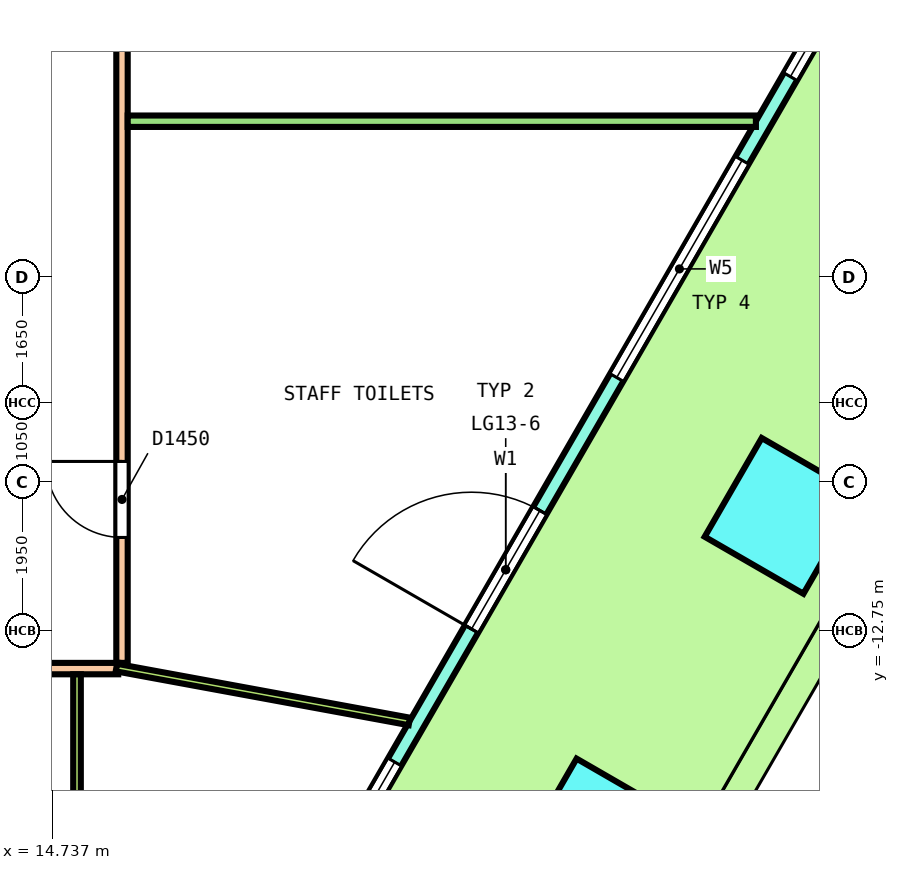
"""IFC4 building model, lengths in metres.
Left out: names, types, materials, properties, quantities, classifications, styles, units other than length and angle.
Written with IfcOpenShell. Run it as: python <this file> out.ifc"""

import sys

from ifc_helpers import new_model, si_unit, direction, frame, frame_2d, origin, origin_2d, place, context, subcontext, project, spatial, polyline, rectangle, outline, extrude, element, fill, save


model = new_model("IFC4")
c1 = context("Model", 3, precision=1e-05, world=origin(), true_north=direction((0.0, 1.0)))
c2 = subcontext(c1, "Body", "Model", "MODEL_VIEW")
j1 = project(units=[si_unit("LENGTHUNIT", "METRE"), si_unit("PLANEANGLEUNIT", "RADIAN")], contexts=[c1])
p1 = place(None, origin())
s1 = spatial("IfcSite", under=j1, at=p1, CompositionType="ELEMENT")
p2 = place(p1, origin())
s2 = spatial("IfcBuilding", under=s1, at=p2, CompositionType="ELEMENT")
p3 = place(p2, frame((0.0, 0.0, 58.6)))
s3 = spatial("IfcBuildingStorey", under=s2, at=p3, CompositionType="ELEMENT", Elevation=58.6)
for number, where, z_axis, x_axis in (
    (1, (21.905, -15.459, 0.0), (0.0, 0.0, 1.0), (0.5, 0.866, 0.0)),
    (2, (24.341, -11.241, 0.0), (0.0, 0.0, 1.0), (0.5, 0.866, 0.0)),
):
    element("IfcColumn", number, at=place(p3, frame(where, z_axis=z_axis, x_axis=x_axis)), inside=s3, PredefinedType="COLUMN", context=c2, shape_type="SweptSolid", body=[
        extrude(rectangle(XDim=1.5, YDim=1.5, at=origin_2d()), origin(), (0.0, 0.0, 1.0), 4.05),
    ])
p4 = place(p3, frame((14.985, -21.845, 0.0), z_axis=(0.0, 0.0, 1.0), x_axis=(0.50000204422, 0.86602422355, 0.0)))
e3 = element("IfcWall", 3, at=p4, inside=s3, PredefinedType="SOLIDWALL", context=c2, shape_type="SweptSolid", body=[
    extrude(outline(polyline([(-0.027, -0.1), (1.014, -0.1), (2.055, -0.1), (3.097, -0.1), (4.138, -0.1), (5.179, -0.1), (6.22, -0.1), (7.261, -0.1), (8.303, -0.1), (9.344, -0.1), (10.385, -0.1), (11.426, -0.1), (12.468, -0.1), (13.509, -0.1), (14.55, -0.1), (15.591, -0.1), (16.632, -0.1), (17.673, -0.1), (18.715, -0.1), (19.756, -0.1), (20.797, -0.1), (21.838, -0.1), (22.879, -0.1), (22.826, 0.1), (21.789, 0.1), (20.753, 0.1), (19.717, 0.1), (18.68, 0.1), (17.644, 0.1), (16.608, 0.1), (15.572, 0.1), (14.535, 0.1), (13.499, 0.1), (12.463, 0.1), (11.426, 0.1), (10.39, 0.1), (9.354, 0.1), (8.317, 0.1), (7.281, 0.1), (6.245, 0.1), (5.208, 0.1), (4.172, 0.1), (3.136, 0.1), (2.099, 0.1), (1.063, 0.1), (0.027, 0.1), (-0.027, -0.1)])), origin(), (0.0, 0.0, 1.0), 4.1),
])
p5 = place(p4, frame((0.635, 0.0, 0.1)))
e4 = element("IfcOpeningElement", 4, at=p5, cuts=e3, PredefinedType="OPENING", context=c2, shape_type="SweptSolid", body=[
    extrude(rectangle(XDim=3.3, YDim=2.9, at=frame_2d((1.65, 1.45))), frame((0.0, 0.11, 0.0), z_axis=(0.0, -1.0, 0.0), x_axis=(1.0, 0.0, 0.0)), (0.0, 0.0, 1.0), 0.22),
])
p6 = place(p4, frame((5.206, 0.0, 0.1)))
e5 = element("IfcOpeningElement", 5, at=p6, cuts=e3, PredefinedType="OPENING", context=c2, shape_type="SweptSolid", body=[
    extrude(rectangle(XDim=3.3, YDim=2.9, at=frame_2d((1.65, 1.45))), frame((0.0, 0.11, 0.0), z_axis=(0.0, -1.0, 0.0), x_axis=(1.0, 0.0, 0.0)), (0.0, 0.0, 1.0), 0.22),
])
p7 = place(p4, frame((10.526, 0.0, 0.0)))
e6 = element("IfcOpeningElement", 6, at=p7, cuts=e3, PredefinedType="OPENING", context=c2, shape_type="SweptSolid", body=[
    extrude(rectangle(XDim=1.8, YDim=2.4, at=frame_2d((0.9, 1.2))), frame((0.0, 0.11, 0.0), z_axis=(0.0, -1.0, 0.0), x_axis=(1.0, 0.0, 0.0)), (0.0, 0.0, 1.0), 0.22),
])
p8 = place(p4, frame((10.526, 0.0, 2.55)))
e7 = element("IfcOpeningElement", 7, at=p8, cuts=e3, PredefinedType="OPENING", context=c2, shape_type="SweptSolid", body=[
    extrude(rectangle(XDim=1.8, YDim=0.45, at=frame_2d((0.9, 0.225))), frame((0.0, 0.11, 0.0), z_axis=(0.0, -1.0, 0.0), x_axis=(1.0, 0.0, 0.0)), (0.0, 0.0, 1.0), 0.22),
])
p9 = place(p4, frame((14.347, 0.0, 0.1)))
e8 = element("IfcOpeningElement", 8, at=p9, cuts=e3, PredefinedType="OPENING", context=c2, shape_type="SweptSolid", body=[
    extrude(rectangle(XDim=3.3, YDim=2.9, at=frame_2d((1.65, 1.45))), frame((0.0, 0.11, 0.0), z_axis=(0.0, -1.0, 0.0), x_axis=(1.0, 0.0, 0.0)), (0.0, 0.0, 1.0), 0.22),
])
p10 = place(p4, frame((18.917, 0.0, 0.1)))
e9 = element("IfcOpeningElement", 9, at=p10, cuts=e3, PredefinedType="OPENING", context=c2, shape_type="SweptSolid", body=[
    extrude(rectangle(XDim=3.3, YDim=2.9, at=frame_2d((1.65, 1.45))), frame((0.0, 0.11, 0.0), z_axis=(0.0, -1.0, 0.0), x_axis=(1.0, 0.0, 0.0)), (0.0, 0.0, 1.0), 0.22),
])
p11 = place(p3, frame((15.65, -13.175, 0.0), z_axis=(0.0, 0.0, 1.0), x_axis=(0.0, 1.0, 0.0)))
e10 = element("IfcWall", 10, at=p11, inside=s3, PredefinedType="PARTITIONING", context=c2, shape_type="SweptSolid", body=[
    extrude(rectangle(XDim=26.35, YDim=0.15, at=frame_2d((13.175, 0.0))), origin(), (0.0, 0.0, 1.0), 3.05),
])
p12 = place(p11, frame((16.576, 0.0, 0.0)))
e11 = element("IfcOpeningElement", 11, at=p12, cuts=e10, PredefinedType="OPENING", context=c2, shape_type="SweptSolid", body=[
    extrude(rectangle(XDim=1.2, YDim=2.1, at=frame_2d((0.6, 1.05))), frame((0.0, 0.085, 0.0), z_axis=(0.0, -1.0, 0.0), x_axis=(1.0, 0.0, 0.0)), (0.0, 0.0, 1.0), 0.17),
])
p13 = place(p11, frame((22.401, 0.0, 0.0)))
e12 = element("IfcOpeningElement", 12, at=p13, cuts=e10, PredefinedType="OPENING", context=c2, shape_type="SweptSolid", body=[
    extrude(rectangle(XDim=1.0, YDim=2.1, at=frame_2d((0.5, 1.05))), frame((0.0, 0.085, 0.0), z_axis=(0.0, -1.0, 0.0), x_axis=(1.0, 0.0, 0.0)), (0.0, 0.0, 1.0), 0.17),
])
p14 = place(p11, frame((1.65, 0.0, 0.0)))
e13 = element("IfcOpeningElement", 13, at=p14, cuts=e10, PredefinedType="OPENING", context=c2, shape_type="SweptSolid", body=[
    extrude(rectangle(XDim=1.0, YDim=2.1, at=frame_2d((0.5, 1.05))), frame((0.0, 0.085, 0.0), z_axis=(0.0, -1.0, 0.0), x_axis=(1.0, 0.0, 0.0)), (0.0, 0.0, 1.0), 0.17),
])
p15 = place(p3, frame((-15.725, -13.25, 0.0), z_axis=(0.0, 0.0, 1.0), x_axis=(1.0, 0.0, 0.0)))
e14 = element("IfcWall", 14, at=p15, inside=s3, PredefinedType="PARTITIONING", context=c2, shape_type="SweptSolid", body=[
    extrude(rectangle(XDim=31.325, YDim=0.15, at=frame_2d((15.663, 0.0))), origin(), (0.0, 0.0, 1.0), 3.05),
])
p16 = place(p15, frame((0.898, 0.0, 0.0)))
e15 = element("IfcOpeningElement", 15, at=p16, cuts=e14, PredefinedType="OPENING", context=c2, shape_type="SweptSolid", body=[
    extrude(rectangle(XDim=1.0, YDim=2.1, at=frame_2d((0.5, 1.05))), frame((0.0, 0.085, 0.0), z_axis=(0.0, -1.0, 0.0), x_axis=(1.0, 0.0, 0.0)), (0.0, 0.0, 1.0), 0.17),
])
p17 = place(p15, frame((5.198, 0.0, 0.0)))
e16 = element("IfcOpeningElement", 16, at=p17, cuts=e14, PredefinedType="OPENING", context=c2, shape_type="SweptSolid", body=[
    extrude(rectangle(XDim=1.2, YDim=2.1, at=frame_2d((0.6, 1.05))), frame((0.0, 0.085, 0.0), z_axis=(0.0, -1.0, 0.0), x_axis=(1.0, 0.0, 0.0)), (0.0, 0.0, 1.0), 0.17),
])
p18 = place(p15, frame((14.115, 0.0, 0.0)))
e17 = element("IfcOpeningElement", 17, at=p18, cuts=e14, PredefinedType="OPENING", context=c2, shape_type="SweptSolid", body=[
    extrude(rectangle(XDim=1.2, YDim=2.1, at=frame_2d((0.6, 1.05))), frame((0.0, 0.085, 0.0), z_axis=(0.0, -1.0, 0.0), x_axis=(1.0, 0.0, 0.0)), (0.0, 0.0, 1.0), 0.17),
])
p19 = place(p15, frame((22.046, 0.0, 0.0)))
e18 = element("IfcOpeningElement", 18, at=p19, cuts=e14, PredefinedType="OPENING", context=c2, shape_type="SweptSolid", body=[
    extrude(rectangle(XDim=1.0, YDim=2.1, at=frame_2d((0.5, 1.05))), frame((0.0, 0.085, 0.0), z_axis=(0.0, -1.0, 0.0), x_axis=(1.0, 0.0, 0.0)), (0.0, 0.0, 1.0), 0.17),
])
p20 = place(p15, frame((28.358, 0.0, 0.0)))
e19 = element("IfcOpeningElement", 19, at=p20, cuts=e14, PredefinedType="OPENING", context=c2, shape_type="SweptSolid", body=[
    extrude(rectangle(XDim=1.0, YDim=2.1, at=frame_2d((0.5, 1.05))), frame((0.0, 0.085, 0.0), z_axis=(0.0, -1.0, 0.0), x_axis=(1.0, 0.0, 0.0)), (0.0, 0.0, 1.0), 0.17),
])
p21 = place(p3, frame((15.725, -6.049, 0.0), z_axis=(0.0, 0.0, 1.0), x_axis=(1.0, 0.0, 0.0)))
e20 = element("IfcWall", 20, at=p21, inside=s3, PredefinedType="PARTITIONING", context=c2, shape_type="SweptSolid", body=[
    extrude(rectangle(XDim=8.264, YDim=0.15, at=frame_2d((4.132, 0.0))), origin(), (0.0, 0.0, 1.0), 3.05),
])
p22 = place(p3, frame((15.058, -21.519, 0.0), z_axis=(0.0, 0.0, 1.0), x_axis=(0.0, 1.0, 0.0)))
e21 = element("IfcWall", 21, at=p22, inside=s3, PredefinedType="PARTITIONING", context=c2, shape_type="SweptSolid", body=[
    extrude(rectangle(XDim=8.194, YDim=0.1, at=frame_2d((4.097, 0.0))), origin(), (0.0, 0.0, 1.0), 3.05),
])
p23 = place(p22, frame((2.649, 0.0, 0.0)))
e22 = element("IfcOpeningElement", 22, at=p23, cuts=e21, PredefinedType="OPENING", context=c2, shape_type="SweptSolid", body=[
    extrude(rectangle(XDim=1.0, YDim=2.1, at=frame_2d((0.5, 1.05))), frame((0.0, 0.06, 0.0), z_axis=(0.0, -1.0, 0.0), x_axis=(1.0, 0.0, 0.0)), (0.0, 0.0, 1.0), 0.12),
])
p24 = place(p3, frame((15.576, -13.236, 0.0), z_axis=(0.0, 0.0, 1.0), x_axis=(0.983499014775, -0.18091348191, 0.0)))
e23 = element("IfcWall", 23, at=p24, inside=s3, PredefinedType="PARTITIONING", context=c2, shape_type="SweptSolid", body=[
    extrude(rectangle(XDim=3.919, YDim=0.1, at=frame_2d((1.959, 0.0))), origin(), (0.0, 0.0, 1.0), 3.05),
])
p25 = place(p6, origin())
e24 = element("IfcWindow", 24, at=p25, inside=s3, PartitioningType="SINGLE_PANEL", PredefinedType="WINDOW", context=c2, shape_type="SweptSolid", body=[
    extrude(rectangle(XDim=3.3, YDim=2.9, at=frame_2d((1.65, 1.45))), frame((0.0, 0.03, 0.0), z_axis=(0.0, -1.0, 0.0), x_axis=(1.0, 0.0, 0.0)), (0.0, 0.0, 1.0), 0.06),
])
fill(e5, e24)
p26 = place(p7, origin())
e25 = element("IfcDoor", 25, at=p26, inside=s3, OperationType="DOUBLE_DOOR_SINGLE_SWING", PredefinedType="DOOR", context=c2, shape_type="SweptSolid", body=[
    extrude(rectangle(XDim=1.8, YDim=2.4, at=frame_2d((0.9, 1.2))), frame((0.0, 0.025, 0.0), z_axis=(0.0, -1.0, 0.0), x_axis=(1.0, 0.0, 0.0)), (0.0, 0.0, 1.0), 0.05),
])
fill(e6, e25)
p27 = place(p8, origin())
e26 = element("IfcWindow", 26, at=p27, inside=s3, PartitioningType="SINGLE_PANEL", PredefinedType="WINDOW", context=c2, shape_type="SweptSolid", body=[
    extrude(rectangle(XDim=1.8, YDim=0.45, at=frame_2d((0.9, 0.225))), frame((0.0, 0.03, 0.0), z_axis=(0.0, -1.0, 0.0), x_axis=(1.0, 0.0, 0.0)), (0.0, 0.0, 1.0), 0.06),
])
fill(e7, e26)
p28 = place(p9, origin())
e27 = element("IfcWindow", 27, at=p28, inside=s3, PartitioningType="SINGLE_PANEL", PredefinedType="WINDOW", context=c2, shape_type="SweptSolid", body=[
    extrude(rectangle(XDim=3.3, YDim=2.9, at=frame_2d((1.65, 1.45))), frame((0.0, 0.03, 0.0), z_axis=(0.0, -1.0, 0.0), x_axis=(1.0, 0.0, 0.0)), (0.0, 0.0, 1.0), 0.06),
])
fill(e8, e27)
p29 = place(p10, origin())
e28 = element("IfcWindow", 28, at=p29, inside=s3, PartitioningType="SINGLE_PANEL", PredefinedType="WINDOW", context=c2, shape_type="SweptSolid", body=[
    extrude(rectangle(XDim=3.3, YDim=2.9, at=frame_2d((1.65, 1.45))), frame((0.0, 0.03, 0.0), z_axis=(0.0, -1.0, 0.0), x_axis=(1.0, 0.0, 0.0)), (0.0, 0.0, 1.0), 0.06),
])
fill(e9, e28)
p30 = place(p14, origin())
e29 = element("IfcDoor", 29, at=p30, inside=s3, OperationType="SINGLE_SWING_RIGHT", PredefinedType="DOOR", context=c2, shape_type="SweptSolid", body=[
    extrude(rectangle(XDim=1.0, YDim=2.1, at=frame_2d((0.5, 1.05))), frame((0.0, 0.025, 0.0), z_axis=(0.0, -1.0, 0.0), x_axis=(1.0, 0.0, 0.0)), (0.0, 0.0, 1.0), 0.05),
])
fill(e13, e29)
save(model, sys.argv[1])
